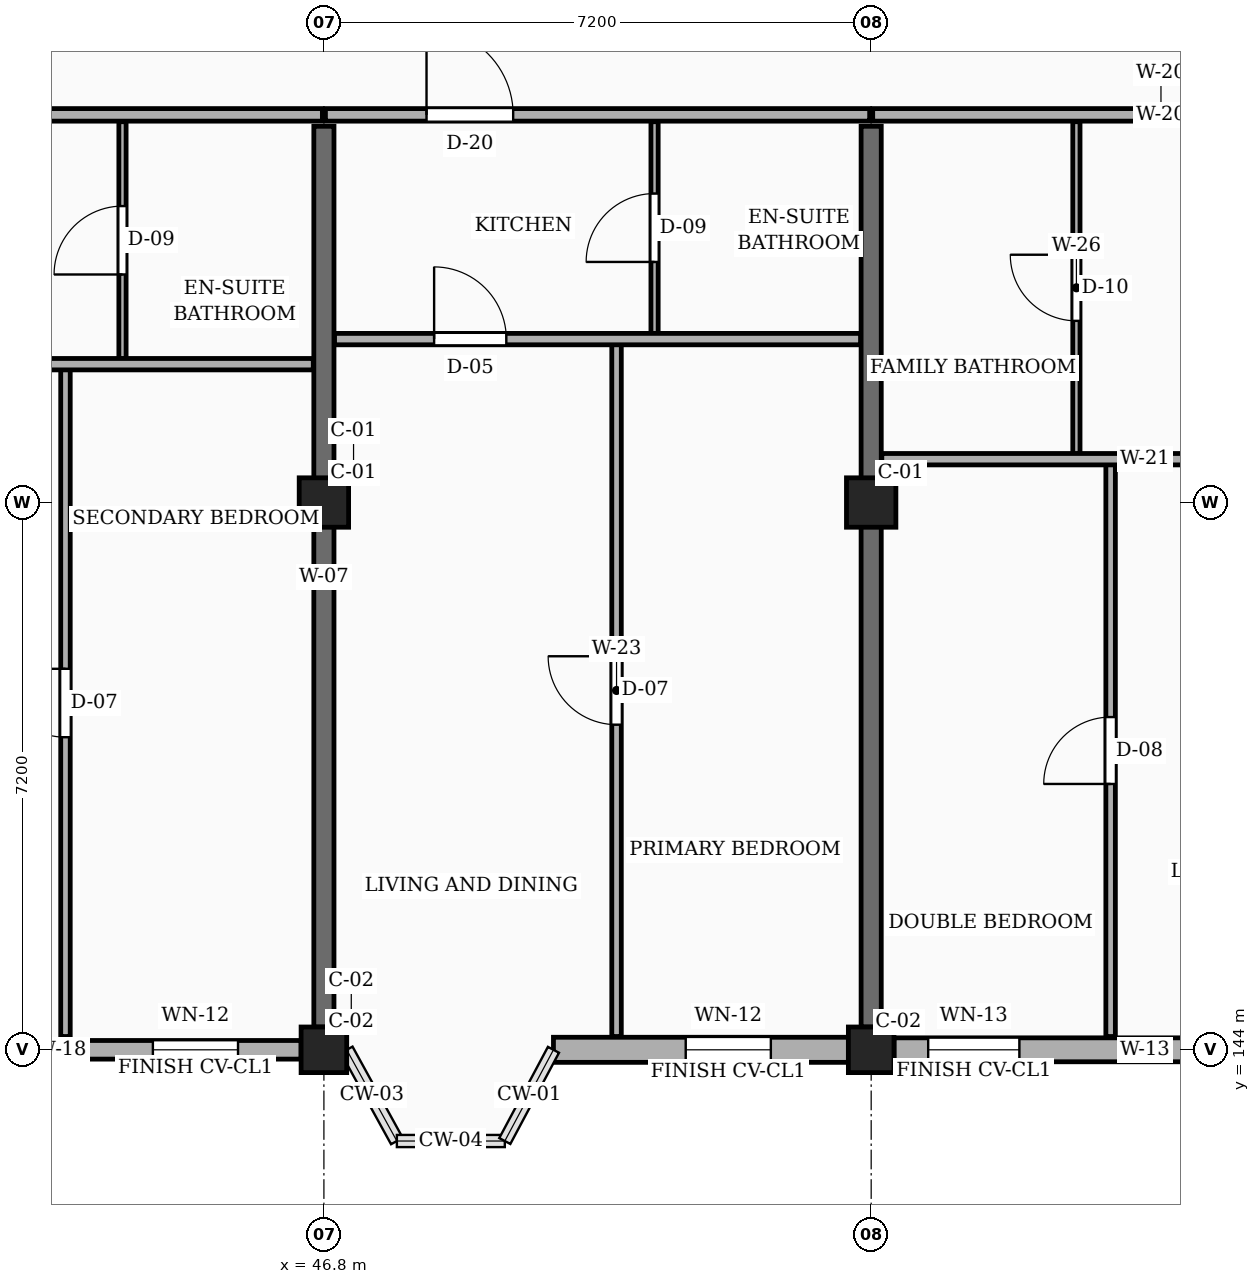
"""IFC4 building model, lengths in metres.
Left out: names, types, materials, properties, quantities, classifications, styles, units other than length and angle.
Written with IfcOpenShell. Run it as: python <this file> out.ifc"""

import sys

from ifc_helpers import new_model, si_unit, direction, frame, frame_2d, origin, origin_2d, place, context, subcontext, project, spatial, rectangle, extrude, element, fill, save


model = new_model("IFC4")
c1 = context("Model", 3, precision=1e-05, world=origin(), true_north=direction((0.0, 1.0)))
c2 = subcontext(c1, "Body", "Model", "MODEL_VIEW")
j1 = project(units=[si_unit("LENGTHUNIT", "METRE"), si_unit("PLANEANGLEUNIT", "RADIAN")], contexts=[c1])
p1 = place(None, origin())
s1 = spatial("IfcSite", under=j1, at=p1, CompositionType="ELEMENT")
p2 = place(p1, origin())
s2 = spatial("IfcBuilding", under=s1, at=p2, CompositionType="ELEMENT")
p3 = place(p2, frame((0.0, 0.0, 7.65)))
s3 = spatial("IfcBuildingStorey", under=s2, at=p3, CompositionType="ELEMENT", Elevation=7.65)
p4 = place(p3, frame((46.8, 144.0, 0.0), z_axis=(0.0, 0.0, 1.0), x_axis=(1.0, 0.0, 0.0)))
e1 = element("IfcColumn", 1, at=p4, inside=s3, PredefinedType="COLUMN", context=c2, shape_type="SweptSolid", body=[
    extrude(rectangle(XDim=0.6, YDim=0.6, at=origin_2d()), origin(), (0.0, 0.0, 1.0), 3.15),
])
p5 = place(p3, frame((46.8, 151.2, 0.0), z_axis=(0.0, 0.0, 1.0), x_axis=(1.0, 0.0, 0.0)))
e2 = element("IfcColumn", 2, at=p5, inside=s3, PredefinedType="COLUMN", context=c2, shape_type="SweptSolid", body=[
    extrude(rectangle(XDim=0.65, YDim=0.65, at=origin_2d()), origin(), (0.0, 0.0, 1.0), 3.15),
])
p6 = place(p3, frame((54.0, 144.0, 0.0), z_axis=(0.0, 0.0, 1.0), x_axis=(1.0, 0.0, 0.0)))
e3 = element("IfcColumn", 3, at=p6, inside=s3, PredefinedType="COLUMN", context=c2, shape_type="SweptSolid", body=[
    extrude(rectangle(XDim=0.6, YDim=0.6, at=origin_2d()), origin(), (0.0, 0.0, 1.0), 3.15),
])
p7 = place(p3, frame((54.0, 151.2, 0.0), z_axis=(0.0, 0.0, 1.0), x_axis=(1.0, 0.0, 0.0)))
e4 = element("IfcColumn", 4, at=p7, inside=s3, PredefinedType="COLUMN", context=c2, shape_type="SweptSolid", body=[
    extrude(rectangle(XDim=0.65, YDim=0.65, at=origin_2d()), origin(), (0.0, 0.0, 1.0), 3.15),
])
for number, where, z_axis, x_axis in (
    (5, (46.8, 144.3, 0.0), (0.0, 0.0, 1.0), (0.0, 1.0, 0.0)),
    (6, (54.0, 144.3, 0.0), (0.0, 0.0, 1.0), (0.0, 1.0, 0.0)),
):
    element("IfcWall", number, at=place(p3, frame(where, z_axis=z_axis, x_axis=x_axis)), inside=s3, PredefinedType="SOLIDWALL", context=c2, shape_type="SweptSolid", body=[
        extrude(rectangle(XDim=11.85, YDim=0.265, at=frame_2d((5.925, 0.0))), origin(), (0.0, 0.0, 1.0), 2.185),
    ])
p8 = place(p3, frame((39.9, 144.0, 0.0), z_axis=(0.0, 0.0, 1.0), x_axis=(1.0, 0.0, 0.0)))
e7 = element("IfcWall", 7, at=p8, inside=s3, PredefinedType="SOLIDWALL", context=c2, shape_type="SweptSolid", body=[
    extrude(rectangle(XDim=6.6, YDim=0.245, at=frame_2d((3.3, 0.0))), origin(), (0.0, 0.0, 1.0), 2.455),
])
p9 = place(p8, frame((0.45, 0.0, 0.78)))
e8 = element("IfcOpeningElement", 8, at=p9, cuts=e7, PredefinedType="OPENING", context=c2, shape_type="SweptSolid", body=[
    extrude(rectangle(XDim=0.96, YDim=1.26, at=frame_2d((0.48, 0.63))), frame((0.0, 0.133, 0.0), z_axis=(0.0, -1.0, 0.0), x_axis=(1.0, 0.0, 0.0)), (0.0, 0.0, 1.0), 0.265),
])
p10 = place(p8, frame((4.65, 0.0, 0.78)))
e9 = element("IfcOpeningElement", 9, at=p10, cuts=e7, PredefinedType="OPENING", context=c2, shape_type="SweptSolid", body=[
    extrude(rectangle(XDim=1.12, YDim=1.26, at=frame_2d((0.56, 0.63))), frame((0.0, 0.133, 0.0), z_axis=(0.0, -1.0, 0.0), x_axis=(1.0, 0.0, 0.0)), (0.0, 0.0, 1.0), 0.265),
])
p11 = place(p3, frame((49.82, 144.0, 0.0), z_axis=(0.0, 0.0, 1.0), x_axis=(1.0, 0.0, 0.0)))
e10 = element("IfcWall", 10, at=p11, inside=s3, PredefinedType="SOLIDWALL", context=c2, shape_type="SweptSolid", body=[
    extrude(rectangle(XDim=3.88, YDim=0.33, at=frame_2d((1.94, 0.0))), origin(), (0.0, 0.0, 1.0), 2.455),
])
p12 = place(p11, frame((1.74, 0.0, 0.78)))
e11 = element("IfcOpeningElement", 11, at=p12, cuts=e10, PredefinedType="OPENING", context=c2, shape_type="SweptSolid", body=[
    extrude(rectangle(XDim=1.12, YDim=1.26, at=frame_2d((0.56, 0.63))), frame((0.0, 0.175, 0.0), z_axis=(0.0, -1.0, 0.0), x_axis=(1.0, 0.0, 0.0)), (0.0, 0.0, 1.0), 0.35),
])
p13 = place(p3, frame((54.3, 144.0, 0.0), z_axis=(0.0, 0.0, 1.0), x_axis=(1.0, 0.0, 0.0)))
e12 = element("IfcWall", 12, at=p13, inside=s3, PredefinedType="SOLIDWALL", context=c2, shape_type="SweptSolid", body=[
    extrude(rectangle(XDim=6.6, YDim=0.315, at=frame_2d((3.3, 0.0))), origin(), (0.0, 0.0, 1.0), 2.455),
])
p14 = place(p13, frame((0.45, 0.0, 0.78)))
e13 = element("IfcOpeningElement", 13, at=p14, cuts=e12, PredefinedType="OPENING", context=c2, shape_type="SweptSolid", body=[
    extrude(rectangle(XDim=1.2, YDim=1.26, at=frame_2d((0.6, 0.63))), frame((0.0, 0.167, 0.0), z_axis=(0.0, -1.0, 0.0), x_axis=(1.0, 0.0, 0.0)), (0.0, 0.0, 1.0), 0.335),
])
p15 = place(p13, frame((4.65, 0.0, 0.78)))
e14 = element("IfcOpeningElement", 14, at=p15, cuts=e12, PredefinedType="OPENING", context=c2, shape_type="SweptSolid", body=[
    extrude(rectangle(XDim=1.36, YDim=1.26, at=frame_2d((0.68, 0.63))), frame((0.0, 0.167, 0.0), z_axis=(0.0, -1.0, 0.0), x_axis=(1.0, 0.0, 0.0)), (0.0, 0.0, 1.0), 0.335),
])
p16 = place(p3, frame((39.62, 156.3, 0.0), z_axis=(0.0, 0.0, 1.0), x_axis=(1.0, 0.0, 0.0)))
e15 = element("IfcWall", 15, at=p16, inside=s3, PredefinedType="PARTITIONING", context=c2, shape_type="SweptSolid", body=[
    extrude(rectangle(XDim=7.16, YDim=0.165, at=frame_2d((3.58, 0.0))), origin(), (0.0, 0.0, 1.0), 2.32),
])
p17 = place(p16, frame((1.33, 0.0, 0.0)))
e16 = element("IfcOpeningElement", 16, at=p17, cuts=e15, PredefinedType="OPENING", context=c2, shape_type="SweptSolid", body=[
    extrude(rectangle(XDim=0.94, YDim=2.12, at=frame_2d((0.47, 1.06))), frame((0.0, 0.093, 0.0), z_axis=(0.0, -1.0, 0.0), x_axis=(1.0, 0.0, 0.0)), (0.0, 0.0, 1.0), 0.185),
])
p18 = place(p3, frame((46.82, 156.3, 0.0), z_axis=(0.0, 0.0, 1.0), x_axis=(1.0, 0.0, 0.0)))
e17 = element("IfcWall", 17, at=p18, inside=s3, PredefinedType="PARTITIONING", context=c2, shape_type="SweptSolid", body=[
    extrude(rectangle(XDim=7.16, YDim=0.165, at=frame_2d((3.58, 0.0))), origin(), (0.0, 0.0, 1.0), 2.32),
])
p19 = place(p18, frame((1.33, 0.0, 0.0)))
e18 = element("IfcOpeningElement", 18, at=p19, cuts=e17, PredefinedType="OPENING", context=c2, shape_type="SweptSolid", body=[
    extrude(rectangle(XDim=1.14, YDim=2.18, at=frame_2d((0.57, 1.09))), frame((0.0, 0.093, 0.0), z_axis=(0.0, -1.0, 0.0), x_axis=(1.0, 0.0, 0.0)), (0.0, 0.0, 1.0), 0.185),
])
p20 = place(p3, frame((54.02, 156.3, 0.0), z_axis=(0.0, 0.0, 1.0), x_axis=(1.0, 0.0, 0.0)))
e19 = element("IfcWall", 19, at=p20, inside=s3, PredefinedType="PARTITIONING", context=c2, shape_type="SweptSolid", body=[
    extrude(rectangle(XDim=7.16, YDim=0.165, at=frame_2d((3.58, 0.0))), origin(), (0.0, 0.0, 1.0), 2.32),
])
p21 = place(p20, frame((4.78, 0.0, 0.0)))
e20 = element("IfcOpeningElement", 20, at=p21, cuts=e19, PredefinedType="OPENING", context=c2, shape_type="SweptSolid", body=[
    extrude(rectangle(XDim=1.0, YDim=2.15, at=frame_2d((0.5, 1.075))), frame((0.0, 0.093, 0.0), z_axis=(0.0, -1.0, 0.0), x_axis=(1.0, 0.0, 0.0)), (0.0, 0.0, 1.0), 0.185),
])
p22 = place(p3, frame((43.4, 144.175, 0.0), z_axis=(0.0, 0.0, 1.0), x_axis=(0.0, 1.0, 0.0)))
e21 = element("IfcWall", 21, at=p22, inside=s3, PredefinedType="PARTITIONING", context=c2, shape_type="SweptSolid", body=[
    extrude(rectangle(XDim=8.775, YDim=0.125, at=frame_2d((4.387, 0.0))), origin(), (0.0, 0.0, 1.0), 2.32),
])
p23 = place(p22, frame((3.938, 0.0, 0.0)))
e22 = element("IfcOpeningElement", 22, at=p23, cuts=e21, PredefinedType="OPENING", context=c2, shape_type="SweptSolid", body=[
    extrude(rectangle(XDim=0.9, YDim=2.1, at=frame_2d((0.45, 1.05))), frame((0.0, 0.073, 0.0), z_axis=(0.0, -1.0, 0.0), x_axis=(1.0, 0.0, 0.0)), (0.0, 0.0, 1.0), 0.145),
])
p24 = place(p3, frame((44.15, 153.09, 0.0), z_axis=(0.0, 0.0, 1.0), x_axis=(0.0, 1.0, 0.0)))
e23 = element("IfcWall", 23, at=p24, inside=s3, PredefinedType="PARTITIONING", context=c2, shape_type="SweptSolid", body=[
    extrude(rectangle(XDim=3.12, YDim=0.095, at=frame_2d((1.56, 0.0))), origin(), (0.0, 0.0, 1.0), 2.32),
])
p25 = place(p24, frame((1.11, 0.0, 0.0)))
e24 = element("IfcOpeningElement", 24, at=p25, cuts=e23, PredefinedType="OPENING", context=c2, shape_type="SweptSolid", body=[
    extrude(rectangle(XDim=0.9, YDim=2.05, at=frame_2d((0.45, 1.025))), frame((0.0, 0.058, 0.0), z_axis=(0.0, -1.0, 0.0), x_axis=(1.0, 0.0, 0.0)), (0.0, 0.0, 1.0), 0.115),
])
p26 = place(p3, frame((39.74, 153.02, 0.0), z_axis=(0.0, 0.0, 1.0), x_axis=(1.0, 0.0, 0.0)))
e25 = element("IfcWall", 25, at=p26, inside=s3, PredefinedType="PARTITIONING", context=c2, shape_type="SweptSolid", body=[
    extrude(rectangle(XDim=6.92, YDim=0.15, at=frame_2d((3.46, 0.0))), origin(), (0.0, 0.0, 1.0), 2.32),
])
p27 = place(p26, frame((1.31, 0.0, 0.0)))
e26 = element("IfcOpeningElement", 26, at=p27, cuts=e25, PredefinedType="OPENING", context=c2, shape_type="SweptSolid", body=[
    extrude(rectangle(XDim=0.95, YDim=2.1, at=frame_2d((0.475, 1.05))), frame((0.0, 0.085, 0.0), z_axis=(0.0, -1.0, 0.0), x_axis=(1.0, 0.0, 0.0)), (0.0, 0.0, 1.0), 0.17),
])
p28 = place(p3, frame((50.65, 144.175, 0.0), z_axis=(0.0, 0.0, 1.0), x_axis=(0.0, 1.0, 0.0)))
e27 = element("IfcWall", 27, at=p28, inside=s3, PredefinedType="PARTITIONING", context=c2, shape_type="SweptSolid", body=[
    extrude(rectangle(XDim=9.105, YDim=0.125, at=frame_2d((4.552, 0.0))), origin(), (0.0, 0.0, 1.0), 2.32),
])
p29 = place(p28, frame((4.103, 0.0, 0.0)))
e28 = element("IfcOpeningElement", 28, at=p29, cuts=e27, PredefinedType="OPENING", context=c2, shape_type="SweptSolid", body=[
    extrude(rectangle(XDim=0.9, YDim=2.1, at=frame_2d((0.45, 1.05))), frame((0.0, 0.073, 0.0), z_axis=(0.0, -1.0, 0.0), x_axis=(1.0, 0.0, 0.0)), (0.0, 0.0, 1.0), 0.145),
])
p30 = place(p3, frame((51.15, 153.42, 0.0), z_axis=(0.0, 0.0, 1.0), x_axis=(0.0, 1.0, 0.0)))
e29 = element("IfcWall", 29, at=p30, inside=s3, PredefinedType="PARTITIONING", context=c2, shape_type="SweptSolid", body=[
    extrude(rectangle(XDim=2.79, YDim=0.095, at=frame_2d((1.395, 0.0))), origin(), (0.0, 0.0, 1.0), 2.32),
])
p31 = place(p30, frame((0.945, 0.0, 0.0)))
e30 = element("IfcOpeningElement", 30, at=p31, cuts=e29, PredefinedType="OPENING", context=c2, shape_type="SweptSolid", body=[
    extrude(rectangle(XDim=0.9, YDim=2.05, at=frame_2d((0.45, 1.025))), frame((0.0, 0.058, 0.0), z_axis=(0.0, -1.0, 0.0), x_axis=(1.0, 0.0, 0.0)), (0.0, 0.0, 1.0), 0.115),
])
p32 = place(p3, frame((46.94, 153.35, 0.0), z_axis=(0.0, 0.0, 1.0), x_axis=(1.0, 0.0, 0.0)))
e31 = element("IfcWall", 31, at=p32, inside=s3, PredefinedType="PARTITIONING", context=c2, shape_type="SweptSolid", body=[
    extrude(rectangle(XDim=6.92, YDim=0.15, at=frame_2d((3.46, 0.0))), origin(), (0.0, 0.0, 1.0), 2.32),
])
p33 = place(p32, frame((1.31, 0.0, 0.0)))
e32 = element("IfcOpeningElement", 32, at=p33, cuts=e31, PredefinedType="OPENING", context=c2, shape_type="SweptSolid", body=[
    extrude(rectangle(XDim=0.95, YDim=2.1, at=frame_2d((0.475, 1.05))), frame((0.0, 0.085, 0.0), z_axis=(0.0, -1.0, 0.0), x_axis=(1.0, 0.0, 0.0)), (0.0, 0.0, 1.0), 0.17),
])
p34 = place(p3, frame((57.15, 144.175, 0.0), z_axis=(0.0, 0.0, 1.0), x_axis=(0.0, 1.0, 0.0)))
e33 = element("IfcWall", 33, at=p34, inside=s3, PredefinedType="PARTITIONING", context=c2, shape_type="SweptSolid", body=[
    extrude(rectangle(XDim=7.525, YDim=0.125, at=frame_2d((3.762, 0.0))), origin(), (0.0, 0.0, 1.0), 2.32),
])
p35 = place(p34, frame((3.323, 0.0, 0.0)))
e34 = element("IfcOpeningElement", 34, at=p35, cuts=e33, PredefinedType="OPENING", context=c2, shape_type="SweptSolid", body=[
    extrude(rectangle(XDim=0.88, YDim=2.08, at=frame_2d((0.44, 1.04))), frame((0.0, 0.073, 0.0), z_axis=(0.0, -1.0, 0.0), x_axis=(1.0, 0.0, 0.0)), (0.0, 0.0, 1.0), 0.145),
])
p36 = place(p3, frame((56.7, 151.84, 0.0), z_axis=(0.0, 0.0, 1.0), x_axis=(0.0, 1.0, 0.0)))
e35 = element("IfcWall", 35, at=p36, inside=s3, PredefinedType="PARTITIONING", context=c2, shape_type="SweptSolid", body=[
    extrude(rectangle(XDim=4.37, YDim=0.095, at=frame_2d((2.185, 0.0))), origin(), (0.0, 0.0, 1.0), 2.32),
])
p37 = place(p36, frame((1.75, 0.0, 0.0)))
e36 = element("IfcOpeningElement", 36, at=p37, cuts=e35, PredefinedType="OPENING", context=c2, shape_type="SweptSolid", body=[
    extrude(rectangle(XDim=0.87, YDim=2.05, at=frame_2d((0.435, 1.025))), frame((0.0, 0.058, 0.0), z_axis=(0.0, -1.0, 0.0), x_axis=(1.0, 0.0, 0.0)), (0.0, 0.0, 1.0), 0.115),
])
p38 = place(p3, frame((54.14, 151.77, 0.0), z_axis=(0.0, 0.0, 1.0), x_axis=(1.0, 0.0, 0.0)))
e37 = element("IfcWall", 37, at=p38, inside=s3, PredefinedType="PARTITIONING", context=c2, shape_type="SweptSolid", body=[
    extrude(rectangle(XDim=6.92, YDim=0.15, at=frame_2d((3.46, 0.0))), origin(), (0.0, 0.0, 1.0), 2.32),
])
p39 = place(p38, frame((4.66, 0.0, 0.0)))
e38 = element("IfcOpeningElement", 38, at=p39, cuts=e37, PredefinedType="OPENING", context=c2, shape_type="SweptSolid", body=[
    extrude(rectangle(XDim=0.92, YDim=2.1, at=frame_2d((0.46, 1.05))), frame((0.0, 0.085, 0.0), z_axis=(0.0, -1.0, 0.0), x_axis=(1.0, 0.0, 0.0)), (0.0, 0.0, 1.0), 0.17),
])
p40 = place(p10, origin())
e39 = element("IfcWindow", 39, at=p40, inside=s3, PartitioningType="SINGLE_PANEL", PredefinedType="WINDOW", context=c2, shape_type="SweptSolid", body=[
    extrude(rectangle(XDim=1.12, YDim=1.26, at=frame_2d((0.56, 0.63))), frame((0.0, 0.03, 0.0), z_axis=(0.0, -1.0, 0.0), x_axis=(1.0, 0.0, 0.0)), (0.0, 0.0, 1.0), 0.06),
])
fill(e9, e39)
p41 = place(p12, origin())
e40 = element("IfcWindow", 40, at=p41, inside=s3, PartitioningType="SINGLE_PANEL", PredefinedType="WINDOW", context=c2, shape_type="SweptSolid", body=[
    extrude(rectangle(XDim=1.12, YDim=1.26, at=frame_2d((0.56, 0.63))), frame((0.0, 0.03, 0.0), z_axis=(0.0, -1.0, 0.0), x_axis=(1.0, 0.0, 0.0)), (0.0, 0.0, 1.0), 0.06),
])
fill(e11, e40)
p42 = place(p14, origin())
e41 = element("IfcWindow", 41, at=p42, inside=s3, PartitioningType="SINGLE_PANEL", PredefinedType="WINDOW", context=c2, shape_type="SweptSolid", body=[
    extrude(rectangle(XDim=1.2, YDim=1.26, at=frame_2d((0.6, 0.63))), frame((0.0, 0.03, 0.0), z_axis=(0.0, -1.0, 0.0), x_axis=(1.0, 0.0, 0.0)), (0.0, 0.0, 1.0), 0.06),
])
fill(e13, e41)
p43 = place(p19, origin())
e42 = element("IfcDoor", 42, at=p43, inside=s3, OperationType="SINGLE_SWING_LEFT", PredefinedType="DOOR", context=c2, shape_type="SweptSolid", body=[
    extrude(rectangle(XDim=1.14, YDim=2.18, at=frame_2d((0.57, 1.09))), frame((0.0, 0.025, 0.0), z_axis=(0.0, -1.0, 0.0), x_axis=(1.0, 0.0, 0.0)), (0.0, 0.0, 1.0), 0.05),
])
fill(e18, e42)
p44 = place(p23, origin())
e43 = element("IfcDoor", 43, at=p44, inside=s3, OperationType="SINGLE_SWING_RIGHT", PredefinedType="DOOR", context=c2, shape_type="SweptSolid", body=[
    extrude(rectangle(XDim=0.9, YDim=2.1, at=frame_2d((0.45, 1.05))), frame((0.0, 0.025, 0.0), z_axis=(0.0, -1.0, 0.0), x_axis=(1.0, 0.0, 0.0)), (0.0, 0.0, 1.0), 0.05),
])
fill(e22, e43)
p45 = place(p25, origin())
e44 = element("IfcDoor", 44, at=p45, inside=s3, OperationType="SINGLE_SWING_LEFT", PredefinedType="DOOR", context=c2, shape_type="SweptSolid", body=[
    extrude(rectangle(XDim=0.9, YDim=2.05, at=frame_2d((0.45, 1.025))), frame((0.0, 0.025, 0.0), z_axis=(0.0, -1.0, 0.0), x_axis=(1.0, 0.0, 0.0)), (0.0, 0.0, 1.0), 0.05),
])
fill(e24, e44)
p46 = place(p29, origin())
e45 = element("IfcDoor", 45, at=p46, inside=s3, OperationType="SINGLE_SWING_RIGHT", PredefinedType="DOOR", context=c2, shape_type="SweptSolid", body=[
    extrude(rectangle(XDim=0.9, YDim=2.1, at=frame_2d((0.45, 1.05))), frame((0.0, 0.025, 0.0), z_axis=(0.0, -1.0, 0.0), x_axis=(1.0, 0.0, 0.0)), (0.0, 0.0, 1.0), 0.05),
])
fill(e28, e45)
p47 = place(p31, origin())
e46 = element("IfcDoor", 46, at=p47, inside=s3, OperationType="SINGLE_SWING_LEFT", PredefinedType="DOOR", context=c2, shape_type="SweptSolid", body=[
    extrude(rectangle(XDim=0.9, YDim=2.05, at=frame_2d((0.45, 1.025))), frame((0.0, 0.025, 0.0), z_axis=(0.0, -1.0, 0.0), x_axis=(1.0, 0.0, 0.0)), (0.0, 0.0, 1.0), 0.05),
])
fill(e30, e46)
p48 = place(p33, origin())
e47 = element("IfcDoor", 47, at=p48, inside=s3, OperationType="SINGLE_SWING_LEFT", PredefinedType="DOOR", context=c2, shape_type="SweptSolid", body=[
    extrude(rectangle(XDim=0.95, YDim=2.1, at=frame_2d((0.475, 1.05))), frame((0.0, 0.025, 0.0), z_axis=(0.0, -1.0, 0.0), x_axis=(1.0, 0.0, 0.0)), (0.0, 0.0, 1.0), 0.05),
])
fill(e32, e47)
p49 = place(p35, origin())
e48 = element("IfcDoor", 48, at=p49, inside=s3, OperationType="SINGLE_SWING_LEFT", PredefinedType="DOOR", context=c2, shape_type="SweptSolid", body=[
    extrude(rectangle(XDim=0.88, YDim=2.08, at=frame_2d((0.44, 1.04))), frame((0.0, 0.025, 0.0), z_axis=(0.0, -1.0, 0.0), x_axis=(1.0, 0.0, 0.0)), (0.0, 0.0, 1.0), 0.05),
])
fill(e34, e48)
p50 = place(p37, origin())
e49 = element("IfcDoor", 49, at=p50, inside=s3, OperationType="SINGLE_SWING_RIGHT", PredefinedType="DOOR", context=c2, shape_type="SweptSolid", body=[
    extrude(rectangle(XDim=0.87, YDim=2.05, at=frame_2d((0.435, 1.025))), frame((0.0, 0.025, 0.0), z_axis=(0.0, -1.0, 0.0), x_axis=(1.0, 0.0, 0.0)), (0.0, 0.0, 1.0), 0.05),
])
fill(e36, e49)
save(model, sys.argv[1])
